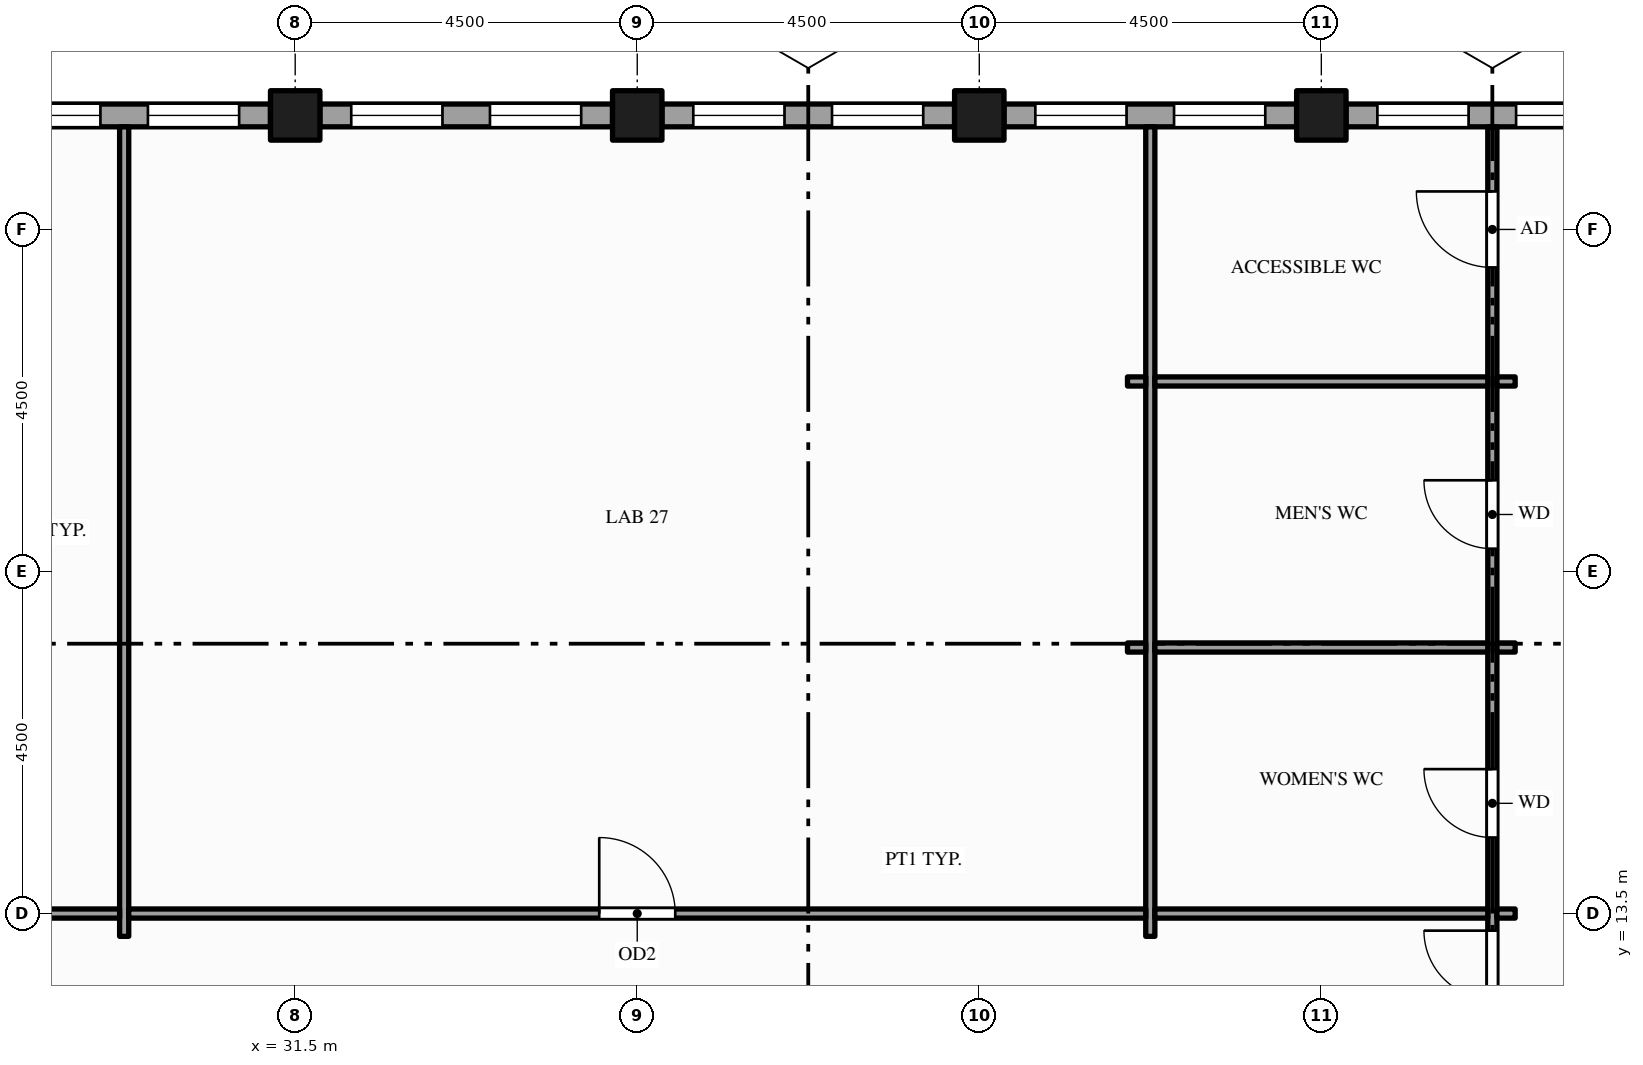
"""IFC4 building model, lengths in metres.
Left out: names, types, materials, properties, quantities, classifications, styles, units other than length and angle.
Written with IfcOpenShell. Run it as: python <this file> out.ifc"""

import sys

from ifc_helpers import new_model, si_unit, direction, frame, frame_2d, origin, origin_2d, place, context, subcontext, project, spatial, rectangle, hollow_rectangle, extrude, element, fill, save


model = new_model("IFC4")
c1 = context("Model", 3, precision=1e-05, world=origin(), true_north=direction((0.0, 1.0)))
c2 = subcontext(c1, "Body", "Model", "MODEL_VIEW")
j1 = project(units=[si_unit("LENGTHUNIT", "METRE"), si_unit("PLANEANGLEUNIT", "RADIAN")], contexts=[c1])
p1 = place(None, origin())
s1 = spatial("IfcSite", under=j1, at=p1, CompositionType="ELEMENT")
p2 = place(p1, origin())
s2 = spatial("IfcBuilding", under=s1, at=p2, CompositionType="ELEMENT")
p3 = place(p2, frame((0.0, 0.0, 261.0)))
s3 = spatial("IfcBuildingStorey", under=s2, at=p3, CompositionType="ELEMENT", Elevation=261.0)
for number, where, z_axis, x_axis in (
    (1, (31.5, 24.0, -0.15), (0.0, 0.0, 1.0), (1.0, 0.0, 0.0)),
    (2, (36.0, 24.0, -0.15), (0.0, 0.0, 1.0), (1.0, 0.0, 0.0)),
    (3, (40.5, 24.0, -0.15), (0.0, 0.0, 1.0), (1.0, 0.0, 0.0)),
    (4, (45.0, 24.0, -0.15), (0.0, 0.0, 1.0), (1.0, 0.0, 0.0)),
):
    element("IfcColumn", number, at=place(p3, frame(where, z_axis=z_axis, x_axis=x_axis)), inside=s3, PredefinedType="COLUMN", context=c2, shape_type="SweptSolid", body=[
        extrude(hollow_rectangle(XDim=0.65, YDim=0.65, WallThickness=0.032, at=origin_2d()), origin(), (0.0, 0.0, 1.0), 4.0),
    ])
p4 = place(p3, frame((49.175, 24.0, 0.0), z_axis=(0.0, 0.0, 1.0), x_axis=(-1.0, 0.0, 0.0)))
e5 = element("IfcWall", 5, at=p4, inside=s3, PredefinedType="STANDARD", context=c2, shape_type="SweptSolid", body=[
    extrude(rectangle(XDim=3.85, YDim=0.3, at=frame_2d((1.925, 0.0))), origin(), (0.0, 0.0, 1.0), 2.87),
])
p5 = place(p4, frame((0.413, 0.0, 0.9)))
e6 = element("IfcOpeningElement", 6, at=p5, cuts=e5, PredefinedType="OPENING", context=c2, shape_type="SweptSolid", body=[
    extrude(rectangle(XDim=1.2, YDim=1.75, at=frame_2d((0.6, 0.875))), frame((0.0, 0.16, 0.0), z_axis=(0.0, -1.0, 0.0), x_axis=(1.0, 0.0, 0.0)), (0.0, 0.0, 1.0), 0.32),
])
p6 = place(p4, frame((2.238, 0.0, 0.9)))
e7 = element("IfcOpeningElement", 7, at=p6, cuts=e5, PredefinedType="OPENING", context=c2, shape_type="SweptSolid", body=[
    extrude(rectangle(XDim=1.2, YDim=1.75, at=frame_2d((0.6, 0.875))), frame((0.0, 0.16, 0.0), z_axis=(0.0, -1.0, 0.0), x_axis=(1.0, 0.0, 0.0)), (0.0, 0.0, 1.0), 0.32),
])
p7 = place(p3, frame((44.675, 24.0, 0.0), z_axis=(0.0, 0.0, 1.0), x_axis=(-1.0, 0.0, 0.0)))
e8 = element("IfcWall", 8, at=p7, inside=s3, PredefinedType="STANDARD", context=c2, shape_type="SweptSolid", body=[
    extrude(rectangle(XDim=3.85, YDim=0.3, at=frame_2d((1.925, 0.0))), origin(), (0.0, 0.0, 1.0), 2.87),
])
p8 = place(p7, frame((0.413, 0.0, 0.9)))
e9 = element("IfcOpeningElement", 9, at=p8, cuts=e8, PredefinedType="OPENING", context=c2, shape_type="SweptSolid", body=[
    extrude(rectangle(XDim=1.2, YDim=1.75, at=frame_2d((0.6, 0.875))), frame((0.0, 0.16, 0.0), z_axis=(0.0, -1.0, 0.0), x_axis=(1.0, 0.0, 0.0)), (0.0, 0.0, 1.0), 0.32),
])
p9 = place(p7, frame((2.238, 0.0, 0.9)))
e10 = element("IfcOpeningElement", 10, at=p9, cuts=e8, PredefinedType="OPENING", context=c2, shape_type="SweptSolid", body=[
    extrude(rectangle(XDim=1.2, YDim=1.75, at=frame_2d((0.6, 0.875))), frame((0.0, 0.16, 0.0), z_axis=(0.0, -1.0, 0.0), x_axis=(1.0, 0.0, 0.0)), (0.0, 0.0, 1.0), 0.32),
])
p10 = place(p3, frame((40.175, 24.0, 0.0), z_axis=(0.0, 0.0, 1.0), x_axis=(-1.0, 0.0, 0.0)))
e11 = element("IfcWall", 11, at=p10, inside=s3, PredefinedType="STANDARD", context=c2, shape_type="SweptSolid", body=[
    extrude(rectangle(XDim=3.85, YDim=0.3, at=frame_2d((1.925, 0.0))), origin(), (0.0, 0.0, 1.0), 2.87),
])
p11 = place(p10, frame((0.413, 0.0, 0.9)))
e12 = element("IfcOpeningElement", 12, at=p11, cuts=e11, PredefinedType="OPENING", context=c2, shape_type="SweptSolid", body=[
    extrude(rectangle(XDim=1.2, YDim=1.75, at=frame_2d((0.6, 0.875))), frame((0.0, 0.16, 0.0), z_axis=(0.0, -1.0, 0.0), x_axis=(1.0, 0.0, 0.0)), (0.0, 0.0, 1.0), 0.32),
])
p12 = place(p10, frame((2.238, 0.0, 0.9)))
e13 = element("IfcOpeningElement", 13, at=p12, cuts=e11, PredefinedType="OPENING", context=c2, shape_type="SweptSolid", body=[
    extrude(rectangle(XDim=1.2, YDim=1.75, at=frame_2d((0.6, 0.875))), frame((0.0, 0.16, 0.0), z_axis=(0.0, -1.0, 0.0), x_axis=(1.0, 0.0, 0.0)), (0.0, 0.0, 1.0), 0.32),
])
p13 = place(p3, frame((35.675, 24.0, 0.0), z_axis=(0.0, 0.0, 1.0), x_axis=(-1.0, 0.0, 0.0)))
e14 = element("IfcWall", 14, at=p13, inside=s3, PredefinedType="STANDARD", context=c2, shape_type="SweptSolid", body=[
    extrude(rectangle(XDim=3.85, YDim=0.3, at=frame_2d((1.925, 0.0))), origin(), (0.0, 0.0, 1.0), 2.87),
])
p14 = place(p13, frame((0.413, 0.0, 0.9)))
e15 = element("IfcOpeningElement", 15, at=p14, cuts=e14, PredefinedType="OPENING", context=c2, shape_type="SweptSolid", body=[
    extrude(rectangle(XDim=1.2, YDim=1.75, at=frame_2d((0.6, 0.875))), frame((0.0, 0.16, 0.0), z_axis=(0.0, -1.0, 0.0), x_axis=(1.0, 0.0, 0.0)), (0.0, 0.0, 1.0), 0.32),
])
p15 = place(p13, frame((2.238, 0.0, 0.9)))
e16 = element("IfcOpeningElement", 16, at=p15, cuts=e14, PredefinedType="OPENING", context=c2, shape_type="SweptSolid", body=[
    extrude(rectangle(XDim=1.2, YDim=1.75, at=frame_2d((0.6, 0.875))), frame((0.0, 0.16, 0.0), z_axis=(0.0, -1.0, 0.0), x_axis=(1.0, 0.0, 0.0)), (0.0, 0.0, 1.0), 0.32),
])
p16 = place(p3, frame((31.175, 24.0, 0.0), z_axis=(0.0, 0.0, 1.0), x_axis=(-1.0, 0.0, 0.0)))
e17 = element("IfcWall", 17, at=p16, inside=s3, PredefinedType="STANDARD", context=c2, shape_type="SweptSolid", body=[
    extrude(rectangle(XDim=3.85, YDim=0.3, at=frame_2d((1.925, 0.0))), origin(), (0.0, 0.0, 1.0), 2.87),
])
p17 = place(p16, frame((0.413, 0.0, 0.9)))
e18 = element("IfcOpeningElement", 18, at=p17, cuts=e17, PredefinedType="OPENING", context=c2, shape_type="SweptSolid", body=[
    extrude(rectangle(XDim=1.2, YDim=1.75, at=frame_2d((0.6, 0.875))), frame((0.0, 0.16, 0.0), z_axis=(0.0, -1.0, 0.0), x_axis=(1.0, 0.0, 0.0)), (0.0, 0.0, 1.0), 0.32),
])
p18 = place(p16, frame((2.238, 0.0, 0.9)))
e19 = element("IfcOpeningElement", 19, at=p18, cuts=e17, PredefinedType="OPENING", context=c2, shape_type="SweptSolid", body=[
    extrude(rectangle(XDim=1.2, YDim=1.75, at=frame_2d((0.6, 0.875))), frame((0.0, 0.16, 0.0), z_axis=(0.0, -1.0, 0.0), x_axis=(1.0, 0.0, 0.0)), (0.0, 0.0, 1.0), 0.32),
])
for number, where, z_axis, x_axis in (
    (20, (29.25, 13.2, 0.0), (0.0, 0.0, 1.0), (0.0, 1.0, 0.0)),
    (21, (42.75, 13.2, 0.0), (0.0, 0.0, 1.0), (0.0, 1.0, 0.0)),
):
    element("IfcWall", number, at=place(p3, frame(where, z_axis=z_axis, x_axis=x_axis)), inside=s3, PredefinedType="PARTITIONING", context=c2, shape_type="SweptSolid", body=[
        extrude(rectangle(XDim=10.65, YDim=0.12, at=frame_2d((5.325, 0.0))), origin(), (0.0, 0.0, 1.0), 2.87),
    ])
p19 = place(p3, frame((47.25, 1.65, 0.0), z_axis=(0.0, 0.0, 1.0), x_axis=(0.0, 1.0, 0.0)))
e22 = element("IfcWall", 22, at=p19, inside=s3, PredefinedType="PARTITIONING", context=c2, shape_type="SweptSolid", body=[
    extrude(rectangle(XDim=22.2, YDim=0.12, at=frame_2d((11.1, 0.0))), origin(), (0.0, 0.0, 1.0), 2.87),
])
p20 = place(p19, frame((9.825, 0.0, 0.0)))
e23 = element("IfcOpeningElement", 23, at=p20, cuts=e22, PredefinedType="OPENING", context=c2, shape_type="SweptSolid", body=[
    extrude(rectangle(XDim=1.8, YDim=2.1, at=frame_2d((0.9, 1.05))), frame((0.0, 0.07, 0.0), z_axis=(0.0, -1.0, 0.0), x_axis=(1.0, 0.0, 0.0)), (0.0, 0.0, 1.0), 0.14),
])
p21 = place(p19, frame((12.85, 0.0, 0.0)))
e24 = element("IfcOpeningElement", 24, at=p21, cuts=e22, PredefinedType="OPENING", context=c2, shape_type="SweptSolid", body=[
    extrude(rectangle(XDim=0.9, YDim=2.1, at=frame_2d((0.45, 1.05))), frame((0.0, 0.07, 0.0), z_axis=(0.0, -1.0, 0.0), x_axis=(1.0, 0.0, 0.0)), (0.0, 0.0, 1.0), 0.14),
])
p22 = place(p19, frame((16.65, 0.0, 0.0)))
e25 = element("IfcOpeningElement", 25, at=p22, cuts=e22, PredefinedType="OPENING", context=c2, shape_type="SweptSolid", body=[
    extrude(rectangle(XDim=0.9, YDim=2.1, at=frame_2d((0.45, 1.05))), frame((0.0, 0.07, 0.0), z_axis=(0.0, -1.0, 0.0), x_axis=(1.0, 0.0, 0.0)), (0.0, 0.0, 1.0), 0.14),
])
p23 = place(p19, frame((20.35, 0.0, 0.0)))
e26 = element("IfcOpeningElement", 26, at=p23, cuts=e22, PredefinedType="OPENING", context=c2, shape_type="SweptSolid", body=[
    extrude(rectangle(XDim=1.0, YDim=2.1, at=frame_2d((0.5, 1.05))), frame((0.0, 0.07, 0.0), z_axis=(0.0, -1.0, 0.0), x_axis=(1.0, 0.0, 0.0)), (0.0, 0.0, 1.0), 0.14),
])
p24 = place(p3, frame((22.56, 13.5, 0.0), z_axis=(0.0, 0.0, 1.0), x_axis=(1.0, 0.0, 0.0)))
e27 = element("IfcWall", 27, at=p24, inside=s3, PredefinedType="PARTITIONING", context=c2, shape_type="SweptSolid", body=[
    extrude(rectangle(XDim=6.63, YDim=0.12, at=frame_2d((3.315, 0.0))), origin(), (0.0, 0.0, 1.0), 2.87),
])
p25 = place(p24, frame((2.815, 0.0, 0.0)))
e28 = element("IfcOpeningElement", 28, at=p25, cuts=e27, PredefinedType="OPENING", context=c2, shape_type="SweptSolid", body=[
    extrude(rectangle(XDim=1.0, YDim=2.1, at=frame_2d((0.5, 1.05))), frame((0.0, 0.07, 0.0), z_axis=(0.0, -1.0, 0.0), x_axis=(1.0, 0.0, 0.0)), (0.0, 0.0, 1.0), 0.14),
])
p26 = place(p3, frame((29.31, 13.5, 0.0), z_axis=(0.0, 0.0, 1.0), x_axis=(1.0, 0.0, 0.0)))
e29 = element("IfcWall", 29, at=p26, inside=s3, PredefinedType="PARTITIONING", context=c2, shape_type="SweptSolid", body=[
    extrude(rectangle(XDim=13.38, YDim=0.12, at=frame_2d((6.69, 0.0))), origin(), (0.0, 0.0, 1.0), 2.87),
])
p27 = place(p26, frame((6.19, 0.0, 0.0)))
e30 = element("IfcOpeningElement", 30, at=p27, cuts=e29, PredefinedType="OPENING", context=c2, shape_type="SweptSolid", body=[
    extrude(rectangle(XDim=1.0, YDim=2.1, at=frame_2d((0.5, 1.05))), frame((0.0, 0.07, 0.0), z_axis=(0.0, -1.0, 0.0), x_axis=(1.0, 0.0, 0.0)), (0.0, 0.0, 1.0), 0.14),
])
p28 = place(p3, frame((42.81, 13.5, 0.0), z_axis=(0.0, 0.0, 1.0), x_axis=(1.0, 0.0, 0.0)))
e31 = element("IfcWall", 31, at=p28, inside=s3, PredefinedType="PARTITIONING", context=c2, shape_type="SweptSolid", body=[
    extrude(rectangle(XDim=4.38, YDim=0.12, at=frame_2d((2.19, 0.0))), origin(), (0.0, 0.0, 1.0), 2.87),
])
for number, where, z_axis, x_axis in (
    (32, (47.31, 13.5, 0.0), (0.0, 0.0, 1.0), (1.0, 0.0, 0.0)),
    (33, (42.45, 17.0, 0.0), (0.0, 0.0, 1.0), (1.0, 0.0, 0.0)),
):
    element("IfcWall", number, at=place(p3, frame(where, z_axis=z_axis, x_axis=x_axis)), inside=s3, PredefinedType="PARTITIONING", context=c2, shape_type="SweptSolid", body=[
        extrude(rectangle(XDim=0.24, YDim=0.12, at=frame_2d((0.12, 0.0))), origin(), (0.0, 0.0, 1.0), 2.87),
    ])
p29 = place(p3, frame((42.81, 17.0, 0.0), z_axis=(0.0, 0.0, 1.0), x_axis=(1.0, 0.0, 0.0)))
e34 = element("IfcWall", 34, at=p29, inside=s3, PredefinedType="PARTITIONING", context=c2, shape_type="SweptSolid", body=[
    extrude(rectangle(XDim=4.38, YDim=0.12, at=frame_2d((2.19, 0.0))), origin(), (0.0, 0.0, 1.0), 2.87),
])
for number, where, z_axis, x_axis in (
    (35, (47.31, 17.0, 0.0), (0.0, 0.0, 1.0), (1.0, 0.0, 0.0)),
    (36, (42.45, 20.5, 0.0), (0.0, 0.0, 1.0), (1.0, 0.0, 0.0)),
):
    element("IfcWall", number, at=place(p3, frame(where, z_axis=z_axis, x_axis=x_axis)), inside=s3, PredefinedType="PARTITIONING", context=c2, shape_type="SweptSolid", body=[
        extrude(rectangle(XDim=0.24, YDim=0.12, at=frame_2d((0.12, 0.0))), origin(), (0.0, 0.0, 1.0), 2.87),
    ])
p30 = place(p3, frame((42.81, 20.5, 0.0), z_axis=(0.0, 0.0, 1.0), x_axis=(1.0, 0.0, 0.0)))
e37 = element("IfcWall", 37, at=p30, inside=s3, PredefinedType="PARTITIONING", context=c2, shape_type="SweptSolid", body=[
    extrude(rectangle(XDim=4.38, YDim=0.12, at=frame_2d((2.19, 0.0))), origin(), (0.0, 0.0, 1.0), 2.87),
])
p31 = place(p3, frame((47.31, 20.5, 0.0), z_axis=(0.0, 0.0, 1.0), x_axis=(1.0, 0.0, 0.0)))
e38 = element("IfcWall", 38, at=p31, inside=s3, PredefinedType="PARTITIONING", context=c2, shape_type="SweptSolid", body=[
    extrude(rectangle(XDim=0.24, YDim=0.12, at=frame_2d((0.12, 0.0))), origin(), (0.0, 0.0, 1.0), 2.87),
])
p32 = place(p5, origin())
e39 = element("IfcWindow", 39, at=p32, inside=s3, PartitioningType="SINGLE_PANEL", PredefinedType="WINDOW", context=c2, shape_type="SweptSolid", body=[
    extrude(rectangle(XDim=1.2, YDim=1.75, at=frame_2d((0.6, 0.875))), frame((0.0, 0.03, 0.0), z_axis=(0.0, -1.0, 0.0), x_axis=(1.0, 0.0, 0.0)), (0.0, 0.0, 1.0), 0.06),
])
fill(e6, e39)
p33 = place(p6, origin())
e40 = element("IfcWindow", 40, at=p33, inside=s3, PartitioningType="SINGLE_PANEL", PredefinedType="WINDOW", context=c2, shape_type="SweptSolid", body=[
    extrude(rectangle(XDim=1.2, YDim=1.75, at=frame_2d((0.6, 0.875))), frame((0.0, 0.03, 0.0), z_axis=(0.0, -1.0, 0.0), x_axis=(1.0, 0.0, 0.0)), (0.0, 0.0, 1.0), 0.06),
])
fill(e7, e40)
p34 = place(p8, origin())
e41 = element("IfcWindow", 41, at=p34, inside=s3, PartitioningType="SINGLE_PANEL", PredefinedType="WINDOW", context=c2, shape_type="SweptSolid", body=[
    extrude(rectangle(XDim=1.2, YDim=1.75, at=frame_2d((0.6, 0.875))), frame((0.0, 0.03, 0.0), z_axis=(0.0, -1.0, 0.0), x_axis=(1.0, 0.0, 0.0)), (0.0, 0.0, 1.0), 0.06),
])
fill(e9, e41)
p35 = place(p9, origin())
e42 = element("IfcWindow", 42, at=p35, inside=s3, PartitioningType="SINGLE_PANEL", PredefinedType="WINDOW", context=c2, shape_type="SweptSolid", body=[
    extrude(rectangle(XDim=1.2, YDim=1.75, at=frame_2d((0.6, 0.875))), frame((0.0, 0.03, 0.0), z_axis=(0.0, -1.0, 0.0), x_axis=(1.0, 0.0, 0.0)), (0.0, 0.0, 1.0), 0.06),
])
fill(e10, e42)
p36 = place(p11, origin())
e43 = element("IfcWindow", 43, at=p36, inside=s3, PartitioningType="SINGLE_PANEL", PredefinedType="WINDOW", context=c2, shape_type="SweptSolid", body=[
    extrude(rectangle(XDim=1.2, YDim=1.75, at=frame_2d((0.6, 0.875))), frame((0.0, 0.03, 0.0), z_axis=(0.0, -1.0, 0.0), x_axis=(1.0, 0.0, 0.0)), (0.0, 0.0, 1.0), 0.06),
])
fill(e12, e43)
p37 = place(p12, origin())
e44 = element("IfcWindow", 44, at=p37, inside=s3, PartitioningType="SINGLE_PANEL", PredefinedType="WINDOW", context=c2, shape_type="SweptSolid", body=[
    extrude(rectangle(XDim=1.2, YDim=1.75, at=frame_2d((0.6, 0.875))), frame((0.0, 0.03, 0.0), z_axis=(0.0, -1.0, 0.0), x_axis=(1.0, 0.0, 0.0)), (0.0, 0.0, 1.0), 0.06),
])
fill(e13, e44)
p38 = place(p14, origin())
e45 = element("IfcWindow", 45, at=p38, inside=s3, PartitioningType="SINGLE_PANEL", PredefinedType="WINDOW", context=c2, shape_type="SweptSolid", body=[
    extrude(rectangle(XDim=1.2, YDim=1.75, at=frame_2d((0.6, 0.875))), frame((0.0, 0.03, 0.0), z_axis=(0.0, -1.0, 0.0), x_axis=(1.0, 0.0, 0.0)), (0.0, 0.0, 1.0), 0.06),
])
fill(e15, e45)
p39 = place(p15, origin())
e46 = element("IfcWindow", 46, at=p39, inside=s3, PartitioningType="SINGLE_PANEL", PredefinedType="WINDOW", context=c2, shape_type="SweptSolid", body=[
    extrude(rectangle(XDim=1.2, YDim=1.75, at=frame_2d((0.6, 0.875))), frame((0.0, 0.03, 0.0), z_axis=(0.0, -1.0, 0.0), x_axis=(1.0, 0.0, 0.0)), (0.0, 0.0, 1.0), 0.06),
])
fill(e16, e46)
p40 = place(p17, origin())
e47 = element("IfcWindow", 47, at=p40, inside=s3, PartitioningType="SINGLE_PANEL", PredefinedType="WINDOW", context=c2, shape_type="SweptSolid", body=[
    extrude(rectangle(XDim=1.2, YDim=1.75, at=frame_2d((0.6, 0.875))), frame((0.0, 0.03, 0.0), z_axis=(0.0, -1.0, 0.0), x_axis=(1.0, 0.0, 0.0)), (0.0, 0.0, 1.0), 0.06),
])
fill(e18, e47)
p41 = place(p18, origin())
e48 = element("IfcWindow", 48, at=p41, inside=s3, PartitioningType="SINGLE_PANEL", PredefinedType="WINDOW", context=c2, shape_type="SweptSolid", body=[
    extrude(rectangle(XDim=1.2, YDim=1.75, at=frame_2d((0.6, 0.875))), frame((0.0, 0.03, 0.0), z_axis=(0.0, -1.0, 0.0), x_axis=(1.0, 0.0, 0.0)), (0.0, 0.0, 1.0), 0.06),
])
fill(e19, e48)
p42 = place(p20, origin())
e49 = element("IfcDoor", 49, at=p42, inside=s3, OperationType="DOUBLE_DOOR_SINGLE_SWING", PredefinedType="DOOR", context=c2, shape_type="SweptSolid", body=[
    extrude(rectangle(XDim=1.8, YDim=2.1, at=frame_2d((0.9, 1.05))), frame((0.0, 0.025, 0.0), z_axis=(0.0, -1.0, 0.0), x_axis=(1.0, 0.0, 0.0)), (0.0, 0.0, 1.0), 0.05),
])
fill(e23, e49)
p43 = place(p27, origin())
e50 = element("IfcDoor", 50, at=p43, inside=s3, OperationType="SINGLE_SWING_LEFT", PredefinedType="DOOR", context=c2, shape_type="SweptSolid", body=[
    extrude(rectangle(XDim=1.0, YDim=2.1, at=frame_2d((0.5, 1.05))), frame((0.0, 0.025, 0.0), z_axis=(0.0, -1.0, 0.0), x_axis=(1.0, 0.0, 0.0)), (0.0, 0.0, 1.0), 0.05),
])
fill(e30, e50)
p44 = place(p21, origin())
e51 = element("IfcDoor", 51, at=p44, inside=s3, OperationType="SINGLE_SWING_RIGHT", PredefinedType="DOOR", context=c2, shape_type="SweptSolid", body=[
    extrude(rectangle(XDim=0.9, YDim=2.1, at=frame_2d((0.45, 1.05))), frame((0.0, 0.025, 0.0), z_axis=(0.0, -1.0, 0.0), x_axis=(1.0, 0.0, 0.0)), (0.0, 0.0, 1.0), 0.05),
])
fill(e24, e51)
p45 = place(p22, origin())
e52 = element("IfcDoor", 52, at=p45, inside=s3, OperationType="SINGLE_SWING_RIGHT", PredefinedType="DOOR", context=c2, shape_type="SweptSolid", body=[
    extrude(rectangle(XDim=0.9, YDim=2.1, at=frame_2d((0.45, 1.05))), frame((0.0, 0.025, 0.0), z_axis=(0.0, -1.0, 0.0), x_axis=(1.0, 0.0, 0.0)), (0.0, 0.0, 1.0), 0.05),
])
fill(e25, e52)
p46 = place(p23, origin())
e53 = element("IfcDoor", 53, at=p46, inside=s3, OperationType="SINGLE_SWING_RIGHT", PredefinedType="DOOR", context=c2, shape_type="SweptSolid", body=[
    extrude(rectangle(XDim=1.0, YDim=2.1, at=frame_2d((0.5, 1.05))), frame((0.0, 0.025, 0.0), z_axis=(0.0, -1.0, 0.0), x_axis=(1.0, 0.0, 0.0)), (0.0, 0.0, 1.0), 0.05),
])
fill(e26, e53)
save(model, sys.argv[1])
